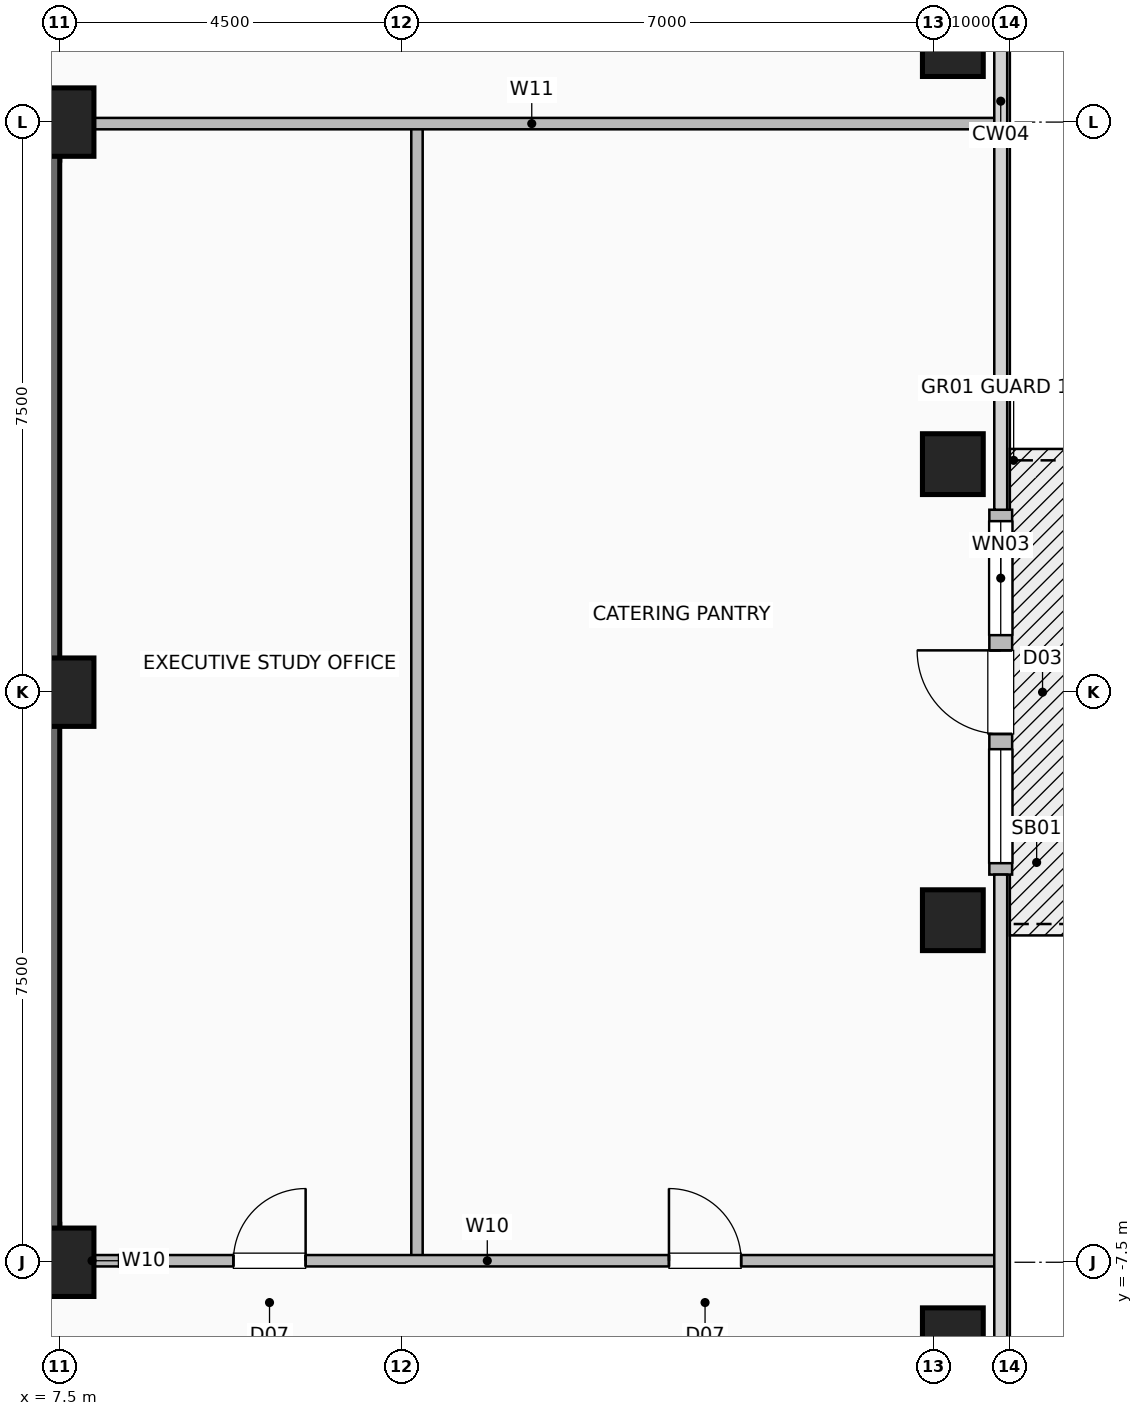
"""IFC4 building model, lengths in metres.
Left out: names, types, materials, properties, quantities, classifications, styles, units other than length and angle.
Written with IfcOpenShell. Run it as: python <this file> out.ifc"""

import sys

from ifc_helpers import new_model, si_unit, direction, frame, frame_2d, origin, origin_2d, place, context, subcontext, project, spatial, rectangle, hollow_rectangle, extrude, element, fill, save


model = new_model("IFC4")
c1 = context("Model", 3, precision=1e-05, world=origin(), true_north=direction((0.0, 1.0)))
c2 = subcontext(c1, "Body", "Model", "MODEL_VIEW")
j1 = project(units=[si_unit("LENGTHUNIT", "METRE"), si_unit("PLANEANGLEUNIT", "RADIAN")], contexts=[c1])
p1 = place(None, origin())
s1 = spatial("IfcSite", under=j1, at=p1, CompositionType="ELEMENT")
p2 = place(p1, origin())
s2 = spatial("IfcBuilding", under=s1, at=p2, CompositionType="ELEMENT")
p3 = place(p2, frame((0.0, 0.0, 187.8)))
s3 = spatial("IfcBuildingStorey", under=s2, at=p3, CompositionType="ELEMENT", Elevation=187.8)
for number, where, z_axis, x_axis in (
    (1, (7.5, -7.5, 0.0), (0.0, 0.0, 1.0), (1.0, 0.0, 0.0)),
    (2, (7.5, 0.0, 0.0), (0.0, 0.0, 1.0), (1.0, 0.0, 0.0)),
    (3, (7.5, 7.5, 0.0), (0.0, 0.0, 1.0), (1.0, 0.0, 0.0)),
):
    element("IfcColumn", number, at=place(p3, frame(where, z_axis=z_axis, x_axis=x_axis)), inside=s3, PredefinedType="COLUMN", context=c2, shape_type="SweptSolid", body=[
        extrude(hollow_rectangle(XDim=0.9, YDim=0.9, WallThickness=0.045, at=origin_2d()), origin(), (0.0, 0.0, 1.0), 3.6),
    ])
for number, where, z_axis, x_axis in (
    (4, (19.25, -8.5, 0.0), (0.0, 0.0, 1.0), (1.0, 0.0, 0.0)),
    (5, (19.25, -3.0, 0.0), (0.0, 0.0, 1.0), (1.0, 0.0, 0.0)),
    (6, (19.25, 3.0, 0.0), (0.0, 0.0, 1.0), (1.0, 0.0, 0.0)),
    (7, (19.25, 8.5, 0.0), (0.0, 0.0, 1.0), (1.0, 0.0, 0.0)),
):
    element("IfcColumn", number, at=place(p3, frame(where, z_axis=z_axis, x_axis=x_axis)), inside=s3, PredefinedType="COLUMN", context=c2, shape_type="SweptSolid", body=[
        extrude(hollow_rectangle(XDim=0.8, YDim=0.8, WallThickness=0.04, at=origin_2d()), origin(), (0.0, 0.0, 1.0), 3.6),
    ])
p4 = place(p3, frame((19.88, -2.4, 0.0), z_axis=(0.0, 0.0, 1.0), x_axis=(0.0, 1.0, 0.0)))
e8 = element("IfcWall", 8, at=p4, inside=s3, PredefinedType="SOLIDWALL", context=c2, shape_type="SweptSolid", body=[
    extrude(rectangle(XDim=4.8, YDim=0.3, at=frame_2d((2.4, 0.0))), origin(), (0.0, 0.0, 1.0), 3.36),
])
p5 = place(p4, frame((1.85, 0.0, 0.0)))
e9 = element("IfcOpeningElement", 9, at=p5, cuts=e8, PredefinedType="OPENING", context=c2, shape_type="SweptSolid", body=[
    extrude(rectangle(XDim=1.1, YDim=2.2, at=frame_2d((0.55, 1.1))), frame((0.0, 0.16, 0.0), z_axis=(0.0, -1.0, 0.0), x_axis=(1.0, 0.0, 0.0)), (0.0, 0.0, 1.0), 0.32),
])
p6 = place(p4, frame((0.15, 0.0, 0.85)))
e10 = element("IfcOpeningElement", 10, at=p6, cuts=e8, PredefinedType="OPENING", context=c2, shape_type="SweptSolid", body=[
    extrude(rectangle(XDim=1.5, YDim=1.8, at=frame_2d((0.75, 0.9))), frame((0.0, 0.16, 0.0), z_axis=(0.0, -1.0, 0.0), x_axis=(1.0, 0.0, 0.0)), (0.0, 0.0, 1.0), 0.32),
])
p7 = place(p4, frame((3.15, 0.0, 0.85)))
e11 = element("IfcOpeningElement", 11, at=p7, cuts=e8, PredefinedType="OPENING", context=c2, shape_type="SweptSolid", body=[
    extrude(rectangle(XDim=1.5, YDim=1.8, at=frame_2d((0.75, 0.9))), frame((0.0, 0.16, 0.0), z_axis=(0.0, -1.0, 0.0), x_axis=(1.0, 0.0, 0.0)), (0.0, 0.0, 1.0), 0.32),
])
p8 = place(p3, frame((-7.5, -7.25, 0.0), z_axis=(0.0, 0.0, 1.0), x_axis=(1.0, 0.0, 0.0)))
e12 = element("IfcWall", 12, at=p8, inside=s3, PredefinedType="SHEAR", context=c2, shape_type="SweptSolid", body=[
    extrude(rectangle(XDim=15.0, YDim=0.5, at=frame_2d((7.5, 0.0))), origin(), (0.0, 0.0, 1.0), 3.36),
])
p9 = place(p8, frame((1.55, 0.0, 0.0)))
e13 = element("IfcOpeningElement", 13, at=p9, cuts=e12, PredefinedType="OPENING", context=c2, shape_type="SweptSolid", body=[
    extrude(rectangle(XDim=1.05, YDim=2.08, at=frame_2d((0.525, 1.04))), frame((0.0, 0.26, 0.0), z_axis=(0.0, -1.0, 0.0), x_axis=(1.0, 0.0, 0.0)), (0.0, 0.0, 1.0), 0.52),
])
p10 = place(p8, frame((12.4, 0.0, 0.0)))
e14 = element("IfcOpeningElement", 14, at=p10, cuts=e12, PredefinedType="OPENING", context=c2, shape_type="SweptSolid", body=[
    extrude(rectangle(XDim=1.05, YDim=2.08, at=frame_2d((0.525, 1.04))), frame((0.0, 0.26, 0.0), z_axis=(0.0, -1.0, 0.0), x_axis=(1.0, 0.0, 0.0)), (0.0, 0.0, 1.0), 0.52),
])
p11 = place(p8, frame((5.2, 0.0, 0.0)))
e15 = element("IfcOpeningElement", 15, at=p11, cuts=e12, PredefinedType="OPENING", context=c2, shape_type="SweptSolid", body=[
    extrude(rectangle(XDim=1.0, YDim=2.08, at=frame_2d((0.5, 1.04))), frame((0.0, 0.26, 0.0), z_axis=(0.0, -1.0, 0.0), x_axis=(1.0, 0.0, 0.0)), (0.0, 0.0, 1.0), 0.52),
])
p12 = place(p8, frame((8.65, 0.0, 0.0)))
e16 = element("IfcOpeningElement", 16, at=p12, cuts=e12, PredefinedType="OPENING", context=c2, shape_type="SweptSolid", body=[
    extrude(rectangle(XDim=1.0, YDim=2.08, at=frame_2d((0.5, 1.04))), frame((0.0, 0.26, 0.0), z_axis=(0.0, -1.0, 0.0), x_axis=(1.0, 0.0, 0.0)), (0.0, 0.0, 1.0), 0.52),
])
for number, where, z_axis, x_axis in (
    (17, (-7.5, 7.25, 0.0), (0.0, 0.0, 1.0), (1.0, 0.0, 0.0)),
    (18, (7.25, -7.5, 0.0), (0.0, 0.0, 1.0), (0.0, 1.0, 0.0)),
):
    element("IfcWall", number, at=place(p3, frame(where, z_axis=z_axis, x_axis=x_axis)), inside=s3, PredefinedType="SHEAR", context=c2, shape_type="SweptSolid", body=[
        extrude(rectangle(XDim=15.0, YDim=0.5, at=frame_2d((7.5, 0.0))), origin(), (0.0, 0.0, 1.0), 3.36),
    ])
p13 = place(p3, frame((7.45, -7.48, 0.0), z_axis=(0.0, 0.0, 1.0), x_axis=(1.0, 0.0, 0.0)))
e19 = element("IfcWall", 19, at=p13, inside=s3, PredefinedType="PARTITIONING", context=c2, shape_type="SweptSolid", body=[
    extrude(rectangle(XDim=0.95, YDim=0.15, at=frame_2d((0.475, 0.0))), origin(), (0.0, 0.0, 1.0), 3.36),
])
p14 = place(p3, frame((12.2, -7.48, 0.0), z_axis=(0.0, 0.0, 1.0), x_axis=(0.0, 1.0, 0.0)))
e20 = element("IfcWall", 20, at=p14, inside=s3, PredefinedType="PARTITIONING", context=c2, shape_type="SweptSolid", body=[
    extrude(rectangle(XDim=14.9, YDim=0.15, at=frame_2d((7.45, 0.0))), origin(), (0.0, 0.0, 1.0), 3.36),
])
p15 = place(p3, frame((8.28, -7.48, 0.0), z_axis=(0.0, 0.0, 1.0), x_axis=(1.0, 0.0, 0.0)))
e21 = element("IfcWall", 21, at=p15, inside=s3, PredefinedType="PARTITIONING", context=c2, shape_type="SweptSolid", body=[
    extrude(rectangle(XDim=11.54, YDim=0.15, at=frame_2d((5.77, 0.0))), origin(), (0.0, 0.0, 1.0), 3.36),
])
p16 = place(p15, frame((1.505, 0.0, 0.0)))
e22 = element("IfcOpeningElement", 22, at=p16, cuts=e21, PredefinedType="OPENING", context=c2, shape_type="SweptSolid", body=[
    extrude(rectangle(XDim=0.95, YDim=2.06, at=frame_2d((0.475, 1.03))), frame((0.0, 0.085, 0.0), z_axis=(0.0, -1.0, 0.0), x_axis=(1.0, 0.0, 0.0)), (0.0, 0.0, 1.0), 0.17),
])
p17 = place(p15, frame((7.235, 0.0, 0.0)))
e23 = element("IfcOpeningElement", 23, at=p17, cuts=e21, PredefinedType="OPENING", context=c2, shape_type="SweptSolid", body=[
    extrude(rectangle(XDim=0.95, YDim=2.06, at=frame_2d((0.475, 1.03))), frame((0.0, 0.085, 0.0), z_axis=(0.0, -1.0, 0.0), x_axis=(1.0, 0.0, 0.0)), (0.0, 0.0, 1.0), 0.17),
])
p18 = place(p3, frame((7.6, 7.48, 0.0), z_axis=(0.0, 0.0, 1.0), x_axis=(1.0, 0.0, 0.0)))
e24 = element("IfcWall", 24, at=p18, inside=s3, PredefinedType="PARTITIONING", context=c2, shape_type="SweptSolid", body=[
    extrude(rectangle(XDim=12.22, YDim=0.15, at=frame_2d((6.11, 0.0))), origin(), (0.0, 0.0, 1.0), 3.36),
])
p19 = place(p5, origin())
e25 = element("IfcDoor", 25, at=p19, inside=s3, OperationType="SINGLE_SWING_RIGHT", PredefinedType="DOOR", context=c2, shape_type="SweptSolid", body=[
    extrude(rectangle(XDim=1.1, YDim=2.2, at=frame_2d((0.55, 1.1))), frame((0.0, 0.025, 0.0), z_axis=(0.0, -1.0, 0.0), x_axis=(1.0, 0.0, 0.0)), (0.0, 0.0, 1.0), 0.05),
])
fill(e9, e25)
p20 = place(p6, origin())
e26 = element("IfcWindow", 26, at=p20, inside=s3, PartitioningType="SINGLE_PANEL", PredefinedType="WINDOW", context=c2, shape_type="SweptSolid", body=[
    extrude(rectangle(XDim=1.5, YDim=1.8, at=frame_2d((0.75, 0.9))), frame((0.0, 0.03, 0.0), z_axis=(0.0, -1.0, 0.0), x_axis=(1.0, 0.0, 0.0)), (0.0, 0.0, 1.0), 0.06),
])
fill(e10, e26)
p21 = place(p7, origin())
e27 = element("IfcWindow", 27, at=p21, inside=s3, PartitioningType="SINGLE_PANEL", PredefinedType="WINDOW", context=c2, shape_type="SweptSolid", body=[
    extrude(rectangle(XDim=1.5, YDim=1.8, at=frame_2d((0.75, 0.9))), frame((0.0, 0.03, 0.0), z_axis=(0.0, -1.0, 0.0), x_axis=(1.0, 0.0, 0.0)), (0.0, 0.0, 1.0), 0.06),
])
fill(e11, e27)
p22 = place(p16, origin())
e28 = element("IfcDoor", 28, at=p22, inside=s3, OperationType="SINGLE_SWING_RIGHT", PredefinedType="DOOR", context=c2, shape_type="SweptSolid", body=[
    extrude(rectangle(XDim=0.95, YDim=2.06, at=frame_2d((0.475, 1.03))), frame((0.0, 0.025, 0.0), z_axis=(0.0, -1.0, 0.0), x_axis=(1.0, 0.0, 0.0)), (0.0, 0.0, 1.0), 0.05),
])
fill(e22, e28)
p23 = place(p17, origin())
e29 = element("IfcDoor", 29, at=p23, inside=s3, OperationType="SINGLE_SWING_LEFT", PredefinedType="DOOR", context=c2, shape_type="SweptSolid", body=[
    extrude(rectangle(XDim=0.95, YDim=2.06, at=frame_2d((0.475, 1.03))), frame((0.0, 0.025, 0.0), z_axis=(0.0, -1.0, 0.0), x_axis=(1.0, 0.0, 0.0)), (0.0, 0.0, 1.0), 0.05),
])
fill(e23, e29)
save(model, sys.argv[1])
